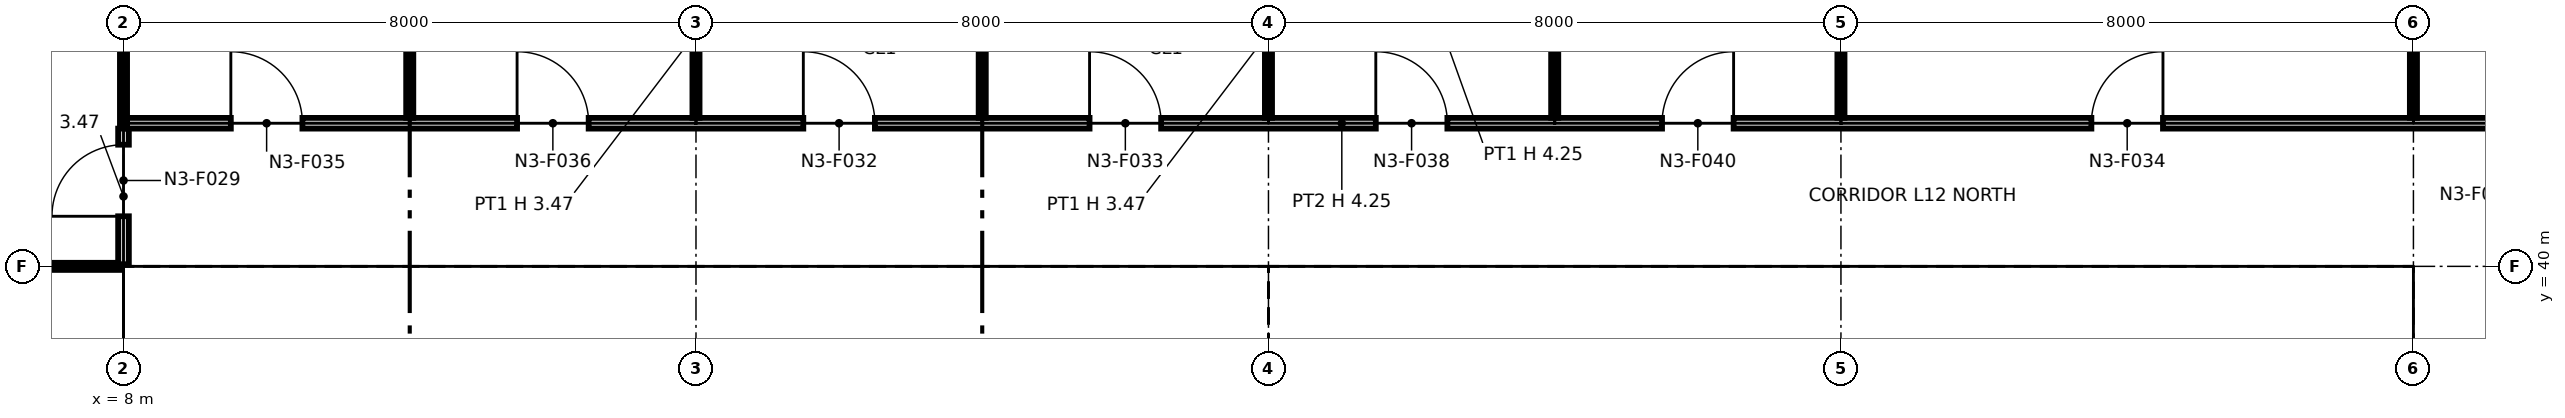
"""IFC4 building model, lengths in metres.
Left out: names, types, materials, properties, quantities, classifications, styles, units other than length and angle.
Written with IfcOpenShell. Run it as: python <this file> out.ifc"""

import sys

from ifc_helpers import new_model, si_unit, direction, frame, frame_2d, origin, origin_2d, place, context, subcontext, project, spatial, polyline, rectangle, i_section, outline, extrude, element, fill, save


model = new_model("IFC4")
c1 = context("Model", 3, precision=1e-05, world=origin(), true_north=direction((0.0, 1.0)))
c2 = subcontext(c1, "Body", "Model", "MODEL_VIEW")
j1 = project(units=[si_unit("LENGTHUNIT", "METRE"), si_unit("PLANEANGLEUNIT", "RADIAN")], contexts=[c1])
p1 = place(None, origin())
s1 = spatial("IfcSite", under=j1, at=p1, CompositionType="ELEMENT")
p2 = place(p1, origin())
s2 = spatial("IfcBuilding", under=s1, at=p2, CompositionType="ELEMENT")
p3 = place(p2, frame((0.0, 0.0, 70.0)))
s3 = spatial("IfcBuildingStorey", under=s2, at=p3, CompositionType="ELEMENT", Elevation=70.0)
for number, where, z_axis, x_axis in (
    (1, (8.0, 40.0, 0.0), (0.0, 0.0, 1.0), (1.0, 0.0, 0.0)),
    (2, (16.0, 40.0, 0.0), (0.0, 0.0, 1.0), (1.0, 0.0, 0.0)),
):
    element("IfcColumn", number, at=place(p3, frame(where, z_axis=z_axis, x_axis=x_axis)), inside=s3, PredefinedType="COLUMN", context=c2, shape_type="SweptSolid", body=[
        extrude(i_section(OverallWidth=0.394, OverallDepth=0.376, WebThickness=0.017, FlangeThickness=0.028, at=origin_2d()), origin(), (0.0, 0.0, 1.0), 4.25),
    ])
p4 = place(p3, frame((24.0, 40.0, 0.0), z_axis=(0.0, 0.0, 1.0), x_axis=(1.0, 0.0, 0.0)))
e3 = element("IfcColumn", 3, at=p4, inside=s3, PredefinedType="COLUMN", context=c2, shape_type="SweptSolid", body=[
    extrude(i_section(OverallWidth=0.399, OverallDepth=0.386, WebThickness=0.021, FlangeThickness=0.033, at=origin_2d()), origin(), (0.0, 0.0, 1.0), 4.25),
])
for number, where, z_axis, x_axis in (
    (4, (32.0, 40.0, 0.0), (0.0, 0.0, 1.0), (1.0, 0.0, 0.0)),
    (5, (40.0, 40.0, 0.0), (0.0, 0.0, 1.0), (1.0, 0.0, 0.0)),
):
    element("IfcColumn", number, at=place(p3, frame(where, z_axis=z_axis, x_axis=x_axis)), inside=s3, PredefinedType="COLUMN", context=c2, shape_type="SweptSolid", body=[
        extrude(i_section(OverallWidth=0.371, OverallDepth=0.361, WebThickness=0.012, FlangeThickness=0.02, at=origin_2d()), origin(), (0.0, 0.0, 1.0), 4.25),
    ])
p5 = place(p3, frame((8.75, 32.85, 0.0), z_axis=(0.0, 0.0, 1.0), x_axis=(0.0, 1.0, 0.0)))
e6 = element("IfcWall", 6, at=p5, inside=s3, PredefinedType="PARTITIONING", context=c2, shape_type="SweptSolid", body=[
    extrude(outline(polyline([(0.0, 0.0), (6.3, 0.0), (6.3, 4.25), (3.231, 4.25), (3.23, 3.789), (3.07, 3.789), (3.069, 4.25), (0.0, 4.25), (0.0, 0.0)])), frame((0.0, 0.1, 0.0), z_axis=(0.0, -1.0, 0.0), x_axis=(1.0, 0.0, 0.0)), (0.0, 0.0, 1.0), 0.2),
])
p6 = place(p3, frame((8.65, 39.25, 0.0), z_axis=(0.0, 0.0, 1.0), x_axis=(1.0, 0.0, 0.0)))
e7 = element("IfcWall", 7, at=p6, inside=s3, PredefinedType="PARTITIONING", context=c2, shape_type="SweptSolid", body=[
    extrude(outline(polyline([(0.0, 0.0), (14.7, 0.0), (14.7, 4.25), (7.469, 4.25), (7.469, 3.632), (7.231, 3.632), (7.23, 4.25), (0.0, 4.25), (0.0, 0.0)])), frame((0.0, 0.1, 0.0), z_axis=(0.0, -1.0, 0.0), x_axis=(1.0, 0.0, 0.0)), (0.0, 0.0, 1.0), 0.2),
])
for number, where, z_axis, x_axis in (
    (8, (11.875, 34.95, 0.0), (0.0, 0.0, 1.0), (0.0, 1.0, 0.0)),
    (9, (13.925, 34.95, 0.0), (0.0, 0.0, 1.0), (0.0, 1.0, 0.0)),
):
    element("IfcWall", number, at=place(p3, frame(where, z_axis=z_axis, x_axis=x_axis)), inside=s3, PredefinedType="PARTITIONING", context=c2, shape_type="SweptSolid", body=[
        extrude(outline(polyline([(0.0, 0.0), (4.2, 0.0), (4.2, 4.25), (1.132, 4.25), (1.131, 3.789), (0.969, 3.789), (0.969, 4.25), (0.0, 4.25), (0.0, 0.0)])), frame((0.0, 0.075, 0.0), z_axis=(0.0, -1.0, 0.0), x_axis=(1.0, 0.0, 0.0)), (0.0, 0.0, 1.0), 0.15),
    ])
p7 = place(p3, frame((16.0, 34.95, 0.0), z_axis=(0.0, 0.0, 1.0), x_axis=(0.0, 1.0, 0.0)))
e10 = element("IfcWall", 10, at=p7, inside=s3, PredefinedType="PARTITIONING", context=c2, shape_type="SweptSolid", body=[
    extrude(rectangle(XDim=4.2, YDim=0.6, at=frame_2d((2.1, 0.0))), origin(), (0.0, 0.0, 1.0), 3.632),
])
for number, where, z_axis, x_axis in (
    (11, (19.2, 32.85, 0.0), (0.0, 0.0, 1.0), (0.0, 1.0, 0.0)),
    (12, (23.25, 32.85, 0.0), (0.0, 0.0, 1.0), (0.0, 1.0, 0.0)),
):
    element("IfcWall", number, at=place(p3, frame(where, z_axis=z_axis, x_axis=x_axis)), inside=s3, PredefinedType="PARTITIONING", context=c2, shape_type="SweptSolid", body=[
        extrude(rectangle(XDim=6.3, YDim=0.2, at=frame_2d((3.15, 0.0))), origin(), (0.0, 0.0, 1.0), 4.25),
    ])
p8 = place(p3, frame((24.75, 32.85, 0.0), z_axis=(0.0, 0.0, 1.0), x_axis=(0.0, 1.0, 0.0)))
e13 = element("IfcWall", 13, at=p8, inside=s3, PredefinedType="PARTITIONING", context=c2, shape_type="SweptSolid", body=[
    extrude(outline(polyline([(0.0, 0.0), (6.3, 0.0), (6.3, 4.25), (3.231, 4.25), (3.23, 3.789), (3.07, 3.789), (3.069, 4.25), (0.0, 4.25), (0.0, 0.0)])), frame((0.0, 0.1, 0.0), z_axis=(0.0, -1.0, 0.0), x_axis=(1.0, 0.0, 0.0)), (0.0, 0.0, 1.0), 0.2),
])
p9 = place(p3, frame((24.65, 39.25, 0.0), z_axis=(0.0, 0.0, 1.0), x_axis=(1.0, 0.0, 0.0)))
e14 = element("IfcWall", 14, at=p9, inside=s3, PredefinedType="PARTITIONING", context=c2, shape_type="SweptSolid", body=[
    extrude(outline(polyline([(0.0, 0.0), (14.7, 0.0), (14.7, 4.25), (7.469, 4.25), (7.469, 3.632), (7.231, 3.632), (7.23, 4.25), (0.0, 4.25), (0.0, 0.0)])), frame((0.0, 0.1, 0.0), z_axis=(0.0, -1.0, 0.0), x_axis=(1.0, 0.0, 0.0)), (0.0, 0.0, 1.0), 0.2),
])
for number, where, z_axis, x_axis in (
    (15, (27.2, 36.6, 0.0), (0.0, 0.0, 1.0), (0.0, 1.0, 0.0)),
    (16, (29.5, 36.6, 0.0), (0.0, 0.0, 1.0), (0.0, 1.0, 0.0)),
):
    element("IfcWall", number, at=place(p3, frame(where, z_axis=z_axis, x_axis=x_axis)), inside=s3, PredefinedType="PARTITIONING", context=c2, shape_type="SweptSolid", body=[
        extrude(rectangle(XDim=2.55, YDim=0.2, at=frame_2d((1.275, 0.0))), origin(), (0.0, 0.0, 1.0), 4.25),
    ])
p10 = place(p3, frame((32.0, 36.6, 0.0), z_axis=(0.0, 0.0, 1.0), x_axis=(0.0, 1.0, 0.0)))
e17 = element("IfcWall", 17, at=p10, inside=s3, PredefinedType="PARTITIONING", context=c2, shape_type="SweptSolid", body=[
    extrude(rectangle(XDim=2.55, YDim=0.6, at=frame_2d((1.275, 0.0))), origin(), (0.0, 0.0, 1.0), 3.632),
])
for number, where, z_axis, x_axis in (
    (18, (35.6, 32.85, 0.0), (0.0, 0.0, 1.0), (0.0, 1.0, 0.0)),
    (19, (39.25, 32.85, 0.0), (0.0, 0.0, 1.0), (0.0, 1.0, 0.0)),
):
    element("IfcWall", number, at=place(p3, frame(where, z_axis=z_axis, x_axis=x_axis)), inside=s3, PredefinedType="PARTITIONING", context=c2, shape_type="SweptSolid", body=[
        extrude(rectangle(XDim=6.3, YDim=0.2, at=frame_2d((3.15, 0.0))), origin(), (0.0, 0.0, 1.0), 4.25),
    ])
p11 = place(p3, frame((4.05, 40.0, 0.0), z_axis=(0.0, 0.0, 1.0), x_axis=(1.0, 0.0, 0.0)))
e20 = element("IfcWall", 20, at=p11, inside=s3, PredefinedType="PARTITIONING", context=c2, shape_type="SweptSolid", body=[
    extrude(rectangle(XDim=3.92, YDim=0.1, at=frame_2d((1.96, 0.0))), origin(), (0.0, 0.0, 1.0), 3.47),
])
p12 = place(p3, frame((8.0, 40.03, 0.0), z_axis=(0.0, 0.0, 1.0), x_axis=(0.0, 1.0, 0.0)))
e21 = element("IfcWall", 21, at=p12, inside=s3, PredefinedType="PARTITIONING", context=c2, shape_type="SweptSolid", body=[
    extrude(rectangle(XDim=1.895, YDim=0.15, at=frame_2d((0.948, 0.0))), origin(), (0.0, 0.0, 1.0), 3.47),
])
p13 = place(p12, frame((0.67, 0.0, 0.0)))
e22 = element("IfcOpeningElement", 22, at=p13, cuts=e21, PredefinedType="OPENING", context=c2, shape_type="SweptSolid", body=[
    extrude(rectangle(XDim=1.0, YDim=2.1, at=frame_2d((0.5, 1.05))), frame((0.0, 0.085, 0.0), z_axis=(0.0, -1.0, 0.0), x_axis=(1.0, 0.0, 0.0)), (0.0, 0.0, 1.0), 0.17),
])
p14 = place(p3, frame((8.05, 42.0, 0.0), z_axis=(0.0, 0.0, 1.0), x_axis=(1.0, 0.0, 0.0)))
e23 = element("IfcWall", 23, at=p14, inside=s3, PredefinedType="PARTITIONING", context=c2, shape_type="SweptSolid", body=[
    extrude(rectangle(XDim=33.95, YDim=0.15, at=frame_2d((16.975, 0.0))), origin(), (0.0, 0.0, 1.0), 4.25),
])
p15 = place(p14, frame((9.45, 0.0, 0.0)))
e24 = element("IfcOpeningElement", 24, at=p15, cuts=e23, PredefinedType="OPENING", context=c2, shape_type="SweptSolid", body=[
    extrude(rectangle(XDim=1.0, YDim=2.1, at=frame_2d((0.5, 1.05))), frame((0.0, 0.085, 0.0), z_axis=(0.0, -1.0, 0.0), x_axis=(1.0, 0.0, 0.0)), (0.0, 0.0, 1.0), 0.17),
])
p16 = place(p14, frame((13.45, 0.0, 0.0)))
e25 = element("IfcOpeningElement", 25, at=p16, cuts=e23, PredefinedType="OPENING", context=c2, shape_type="SweptSolid", body=[
    extrude(rectangle(XDim=1.0, YDim=2.1, at=frame_2d((0.5, 1.05))), frame((0.0, 0.085, 0.0), z_axis=(0.0, -1.0, 0.0), x_axis=(1.0, 0.0, 0.0)), (0.0, 0.0, 1.0), 0.17),
])
p17 = place(p14, frame((27.45, 0.0, 0.0)))
e26 = element("IfcOpeningElement", 26, at=p17, cuts=e23, PredefinedType="OPENING", context=c2, shape_type="SweptSolid", body=[
    extrude(rectangle(XDim=1.0, YDim=2.1, at=frame_2d((0.5, 1.05))), frame((0.0, 0.085, 0.0), z_axis=(0.0, -1.0, 0.0), x_axis=(1.0, 0.0, 0.0)), (0.0, 0.0, 1.0), 0.17),
])
p18 = place(p14, frame((1.45, 0.0, 0.0)))
e27 = element("IfcOpeningElement", 27, at=p18, cuts=e23, PredefinedType="OPENING", context=c2, shape_type="SweptSolid", body=[
    extrude(rectangle(XDim=1.0, YDim=2.1, at=frame_2d((0.5, 1.05))), frame((0.0, 0.085, 0.0), z_axis=(0.0, -1.0, 0.0), x_axis=(1.0, 0.0, 0.0)), (0.0, 0.0, 1.0), 0.17),
])
p19 = place(p14, frame((5.45, 0.0, 0.0)))
e28 = element("IfcOpeningElement", 28, at=p19, cuts=e23, PredefinedType="OPENING", context=c2, shape_type="SweptSolid", body=[
    extrude(rectangle(XDim=1.0, YDim=2.1, at=frame_2d((0.5, 1.05))), frame((0.0, 0.085, 0.0), z_axis=(0.0, -1.0, 0.0), x_axis=(1.0, 0.0, 0.0)), (0.0, 0.0, 1.0), 0.17),
])
p20 = place(p14, frame((17.45, 0.0, 0.0)))
e29 = element("IfcOpeningElement", 29, at=p20, cuts=e23, PredefinedType="OPENING", context=c2, shape_type="SweptSolid", body=[
    extrude(rectangle(XDim=1.0, YDim=2.1, at=frame_2d((0.5, 1.05))), frame((0.0, 0.085, 0.0), z_axis=(0.0, -1.0, 0.0), x_axis=(1.0, 0.0, 0.0)), (0.0, 0.0, 1.0), 0.17),
])
p21 = place(p14, frame((21.45, 0.0, 0.0)))
e30 = element("IfcOpeningElement", 30, at=p21, cuts=e23, PredefinedType="OPENING", context=c2, shape_type="SweptSolid", body=[
    extrude(rectangle(XDim=1.0, YDim=2.1, at=frame_2d((0.5, 1.05))), frame((0.0, 0.085, 0.0), z_axis=(0.0, -1.0, 0.0), x_axis=(1.0, 0.0, 0.0)), (0.0, 0.0, 1.0), 0.17),
])
p22 = place(p3, frame((8.0, 42.0, 0.0), z_axis=(0.0, 0.0, 1.0), x_axis=(0.0, 1.0, 0.0)))
e31 = element("IfcWall", 31, at=p22, inside=s3, PredefinedType="PARTITIONING", context=c2, shape_type="SweptSolid", body=[
    extrude(rectangle(XDim=5.87, YDim=0.1, at=frame_2d((2.935, 0.0))), origin(), (0.0, 0.0, 1.0), 3.47),
])
for number, where, z_axis, x_axis in (
    (32, (12.0, 42.075, 0.0), (0.0, 0.0, 1.0), (0.0, 1.0, 0.0)),
    (33, (16.0, 42.075, 0.0), (0.0, 0.0, 1.0), (0.0, 1.0, 0.0)),
):
    element("IfcWall", number, at=place(p3, frame(where, z_axis=z_axis, x_axis=x_axis)), inside=s3, PredefinedType="PARTITIONING", context=c2, shape_type="SweptSolid", body=[
        extrude(rectangle(XDim=2.375, YDim=0.1, at=frame_2d((1.188, 0.0))), origin(), (0.0, 0.0, 1.0), 3.47),
    ])
p23 = place(p3, frame((20.0, 42.075, 0.0), z_axis=(0.0, 0.0, 1.0), x_axis=(0.0, 1.0, 0.0)))
e34 = element("IfcWall", 34, at=p23, inside=s3, PredefinedType="PARTITIONING", context=c2, shape_type="SweptSolid", body=[
    extrude(rectangle(XDim=3.095, YDim=0.1, at=frame_2d((1.547, 0.0))), origin(), (0.0, 0.0, 1.0), 3.47),
])
for number, where, z_axis, x_axis in (
    (35, (24.0, 42.075, 0.0), (0.0, 0.0, 1.0), (0.0, 1.0, 0.0)),
    (36, (28.0, 42.075, 0.0), (0.0, 0.0, 1.0), (0.0, 1.0, 0.0)),
):
    element("IfcWall", number, at=place(p3, frame(where, z_axis=z_axis, x_axis=x_axis)), inside=s3, PredefinedType="PARTITIONING", context=c2, shape_type="SweptSolid", body=[
        extrude(rectangle(XDim=2.375, YDim=0.1, at=frame_2d((1.188, 0.0))), origin(), (0.0, 0.0, 1.0), 3.47),
    ])
for number, where, z_axis, x_axis in (
    (37, (32.0, 42.075, 0.0), (0.0, 0.0, 1.0), (0.0, 1.0, 0.0)),
    (38, (40.0, 42.075, 0.0), (0.0, 0.0, 1.0), (0.0, 1.0, 0.0)),
):
    element("IfcWall", number, at=place(p3, frame(where, z_axis=z_axis, x_axis=x_axis)), inside=s3, PredefinedType="PARTITIONING", context=c2, shape_type="SweptSolid", body=[
        extrude(rectangle(XDim=3.095, YDim=0.1, at=frame_2d((1.547, 0.0))), origin(), (0.0, 0.0, 1.0), 3.47),
    ])
p24 = place(p13, origin())
e39 = element("IfcDoor", 39, at=p24, inside=s3, OperationType="SINGLE_SWING_LEFT", PredefinedType="DOOR", context=c2, shape_type="SweptSolid", body=[
    extrude(rectangle(XDim=1.0, YDim=2.1, at=frame_2d((0.5, 1.05))), frame((0.0, 0.025, 0.0), z_axis=(0.0, -1.0, 0.0), x_axis=(1.0, 0.0, 0.0)), (0.0, 0.0, 1.0), 0.05),
])
fill(e22, e39)
p25 = place(p15, origin())
e40 = element("IfcDoor", 40, at=p25, inside=s3, OperationType="SINGLE_SWING_LEFT", PredefinedType="DOOR", context=c2, shape_type="SweptSolid", body=[
    extrude(rectangle(XDim=1.0, YDim=2.1, at=frame_2d((0.5, 1.05))), frame((0.0, 0.025, 0.0), z_axis=(0.0, -1.0, 0.0), x_axis=(1.0, 0.0, 0.0)), (0.0, 0.0, 1.0), 0.05),
])
fill(e24, e40)
p26 = place(p16, origin())
e41 = element("IfcDoor", 41, at=p26, inside=s3, OperationType="SINGLE_SWING_LEFT", PredefinedType="DOOR", context=c2, shape_type="SweptSolid", body=[
    extrude(rectangle(XDim=1.0, YDim=2.1, at=frame_2d((0.5, 1.05))), frame((0.0, 0.025, 0.0), z_axis=(0.0, -1.0, 0.0), x_axis=(1.0, 0.0, 0.0)), (0.0, 0.0, 1.0), 0.05),
])
fill(e25, e41)
p27 = place(p17, origin())
e42 = element("IfcDoor", 42, at=p27, inside=s3, OperationType="SINGLE_SWING_RIGHT", PredefinedType="DOOR", context=c2, shape_type="SweptSolid", body=[
    extrude(rectangle(XDim=1.0, YDim=2.1, at=frame_2d((0.5, 1.05))), frame((0.0, 0.025, 0.0), z_axis=(0.0, -1.0, 0.0), x_axis=(1.0, 0.0, 0.0)), (0.0, 0.0, 1.0), 0.05),
])
fill(e26, e42)
p28 = place(p18, origin())
e43 = element("IfcDoor", 43, at=p28, inside=s3, OperationType="SINGLE_SWING_LEFT", PredefinedType="DOOR", context=c2, shape_type="SweptSolid", body=[
    extrude(rectangle(XDim=1.0, YDim=2.1, at=frame_2d((0.5, 1.05))), frame((0.0, 0.025, 0.0), z_axis=(0.0, -1.0, 0.0), x_axis=(1.0, 0.0, 0.0)), (0.0, 0.0, 1.0), 0.05),
])
fill(e27, e43)
p29 = place(p19, origin())
e44 = element("IfcDoor", 44, at=p29, inside=s3, OperationType="SINGLE_SWING_LEFT", PredefinedType="DOOR", context=c2, shape_type="SweptSolid", body=[
    extrude(rectangle(XDim=1.0, YDim=2.1, at=frame_2d((0.5, 1.05))), frame((0.0, 0.025, 0.0), z_axis=(0.0, -1.0, 0.0), x_axis=(1.0, 0.0, 0.0)), (0.0, 0.0, 1.0), 0.05),
])
fill(e28, e44)
p30 = place(p20, origin())
e45 = element("IfcDoor", 45, at=p30, inside=s3, OperationType="SINGLE_SWING_LEFT", PredefinedType="DOOR", context=c2, shape_type="SweptSolid", body=[
    extrude(rectangle(XDim=1.0, YDim=2.1, at=frame_2d((0.5, 1.05))), frame((0.0, 0.025, 0.0), z_axis=(0.0, -1.0, 0.0), x_axis=(1.0, 0.0, 0.0)), (0.0, 0.0, 1.0), 0.05),
])
fill(e29, e45)
p31 = place(p21, origin())
e46 = element("IfcDoor", 46, at=p31, inside=s3, OperationType="SINGLE_SWING_RIGHT", PredefinedType="DOOR", context=c2, shape_type="SweptSolid", body=[
    extrude(rectangle(XDim=1.0, YDim=2.1, at=frame_2d((0.5, 1.05))), frame((0.0, 0.025, 0.0), z_axis=(0.0, -1.0, 0.0), x_axis=(1.0, 0.0, 0.0)), (0.0, 0.0, 1.0), 0.05),
])
fill(e30, e46)
save(model, sys.argv[1])
